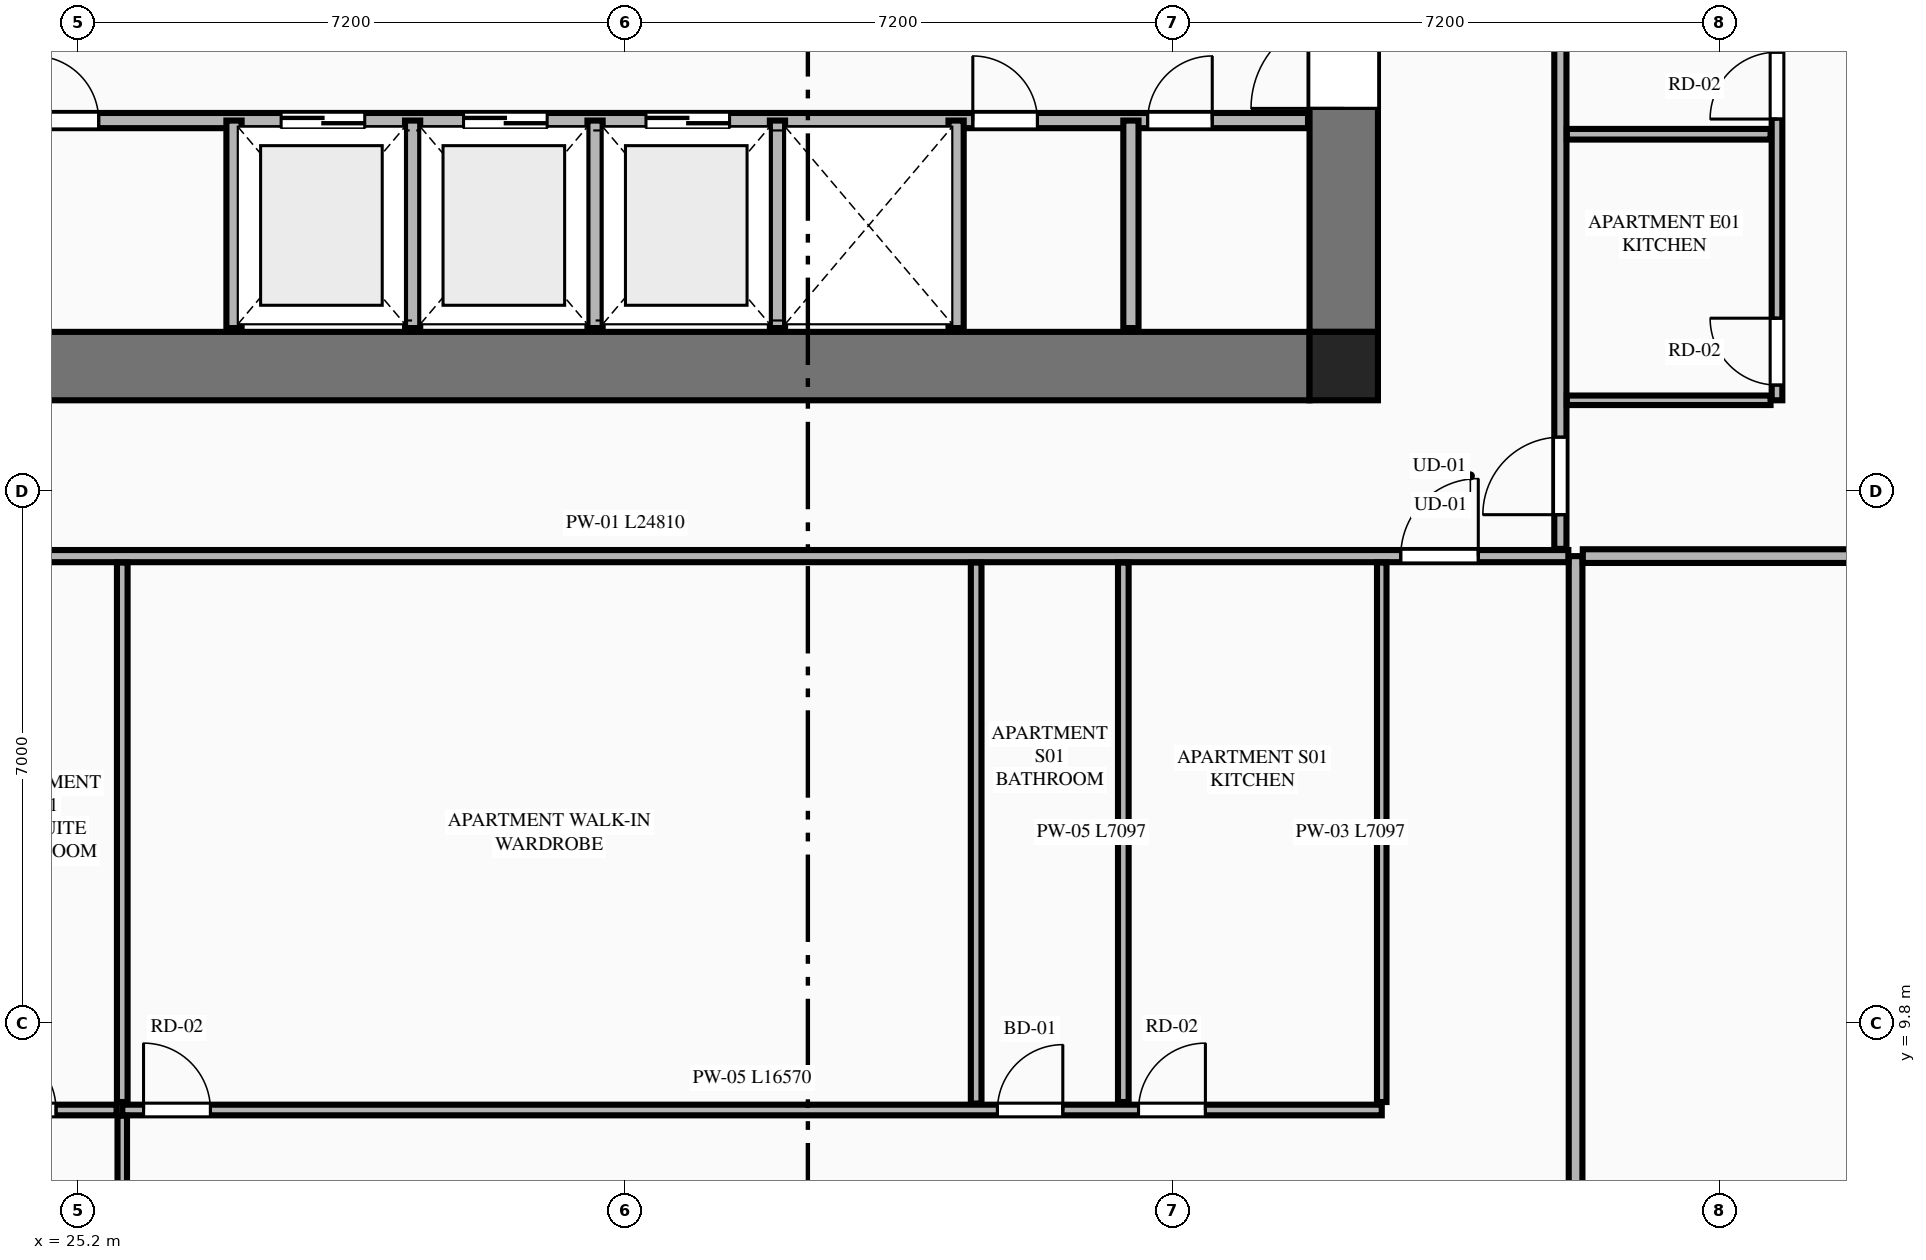
"""IFC4 building model, lengths in metres.
Left out: names, types, materials, properties, quantities, classifications, styles, units other than length and angle.
Written with IfcOpenShell. Run it as: python <this file> out.ifc"""

import sys

from ifc_helpers import new_model, si_unit, direction, frame, frame_2d, origin, origin_2d, place, context, subcontext, project, spatial, rectangle, extrude, element, fill, save


model = new_model("IFC4")
c1 = context("Model", 3, precision=1e-05, world=origin(), true_north=direction((0.0, 1.0)))
c2 = subcontext(c1, "Body", "Model", "MODEL_VIEW")
j1 = project(units=[si_unit("LENGTHUNIT", "METRE"), si_unit("PLANEANGLEUNIT", "RADIAN")], contexts=[c1])
p1 = place(None, origin())
s1 = spatial("IfcSite", under=j1, at=p1, CompositionType="ELEMENT")
p2 = place(p1, origin())
s2 = spatial("IfcBuilding", under=s1, at=p2, CompositionType="ELEMENT")
p3 = place(p2, frame((0.0, 0.0, 49.75)))
s3 = spatial("IfcBuildingStorey", under=s2, at=p3, CompositionType="ELEMENT", Elevation=49.75)
p4 = place(p3, frame((41.85, 18.45, 0.0), z_axis=(0.0, 0.0, 1.0), x_axis=(1.0, 0.0, 0.0)))
e1 = element("IfcColumn", 1, at=p4, inside=s3, PredefinedType="COLUMN", context=c2, shape_type="SweptSolid", body=[
    extrude(rectangle(XDim=0.9, YDim=0.9, at=origin_2d()), origin(), (0.0, 0.0, 1.0), 3.55),
])
p5 = place(p3, frame((23.4, 18.45, 0.0), z_axis=(0.0, 0.0, 1.0), x_axis=(1.0, 0.0, 0.0)))
e2 = element("IfcWall", 2, at=p5, inside=s3, PredefinedType="SHEAR", context=c2, shape_type="SweptSolid", body=[
    extrude(rectangle(XDim=18.0, YDim=0.9, at=frame_2d((9.0, 0.0))), origin(), (0.0, 0.0, 1.0), 3.33),
])
p6 = place(p3, frame((41.85, 18.9, 0.0), z_axis=(0.0, 0.0, 1.0), x_axis=(0.0, 1.0, 0.0)))
e3 = element("IfcWall", 3, at=p6, inside=s3, PredefinedType="SHEAR", context=c2, shape_type="SweptSolid", body=[
    extrude(rectangle(XDim=14.0, YDim=0.9, at=frame_2d((7.0, 0.0))), origin(), (0.0, 0.0, 1.0), 3.33),
])
p7 = place(p6, frame((2.94, 0.0, 0.0)))
e4 = element("IfcOpeningElement", 4, at=p7, cuts=e3, PredefinedType="OPENING", context=c2, shape_type="SweptSolid", body=[
    extrude(rectangle(XDim=1.22, YDim=2.25, at=frame_2d((0.61, 1.125))), frame((0.0, 0.46, 0.0), z_axis=(0.0, -1.0, 0.0), x_axis=(1.0, 0.0, 0.0)), (0.0, 0.0, 1.0), 0.92),
])
p8 = place(p3, frame((23.42, 21.68, 0.0), z_axis=(0.0, 0.0, 1.0), x_axis=(1.0, 0.0, 0.0)))
e5 = element("IfcWall", 5, at=p8, inside=s3, PredefinedType="PLUMBINGWALL", context=c2, shape_type="SweptSolid", body=[
    extrude(rectangle(XDim=17.96, YDim=0.2, at=frame_2d((8.98, 0.0))), origin(), (0.0, 0.0, 1.0), 3.33),
])
p9 = place(p8, frame((4.45, 0.0, 0.0)))
e6 = element("IfcOpeningElement", 6, at=p9, cuts=e5, PredefinedType="OPENING", context=c2, shape_type="SweptSolid", body=[
    extrude(rectangle(XDim=1.1, YDim=2.2, at=frame_2d((0.55, 1.1))), frame((0.0, 0.11, 0.0), z_axis=(0.0, -1.0, 0.0), x_axis=(1.0, 0.0, 0.0)), (0.0, 0.0, 1.0), 0.22),
])
p10 = place(p8, frame((6.85, 0.0, 0.0)))
e7 = element("IfcOpeningElement", 7, at=p10, cuts=e5, PredefinedType="OPENING", context=c2, shape_type="SweptSolid", body=[
    extrude(rectangle(XDim=1.1, YDim=2.2, at=frame_2d((0.55, 1.1))), frame((0.0, 0.11, 0.0), z_axis=(0.0, -1.0, 0.0), x_axis=(1.0, 0.0, 0.0)), (0.0, 0.0, 1.0), 0.22),
])
p11 = place(p8, frame((9.25, 0.0, 0.0)))
e8 = element("IfcOpeningElement", 8, at=p11, cuts=e5, PredefinedType="OPENING", context=c2, shape_type="SweptSolid", body=[
    extrude(rectangle(XDim=1.1, YDim=2.2, at=frame_2d((0.55, 1.1))), frame((0.0, 0.11, 0.0), z_axis=(0.0, -1.0, 0.0), x_axis=(1.0, 0.0, 0.0)), (0.0, 0.0, 1.0), 0.22),
])
p12 = place(p8, frame((1.2, 0.0, 0.0)))
e9 = element("IfcOpeningElement", 9, at=p12, cuts=e5, PredefinedType="OPENING", context=c2, shape_type="SweptSolid", body=[
    extrude(rectangle(XDim=0.85, YDim=2.05, at=frame_2d((0.425, 1.025))), frame((0.0, 0.11, 0.0), z_axis=(0.0, -1.0, 0.0), x_axis=(1.0, 0.0, 0.0)), (0.0, 0.0, 1.0), 0.22),
])
p13 = place(p8, frame((13.55, 0.0, 0.0)))
e10 = element("IfcOpeningElement", 10, at=p13, cuts=e5, PredefinedType="OPENING", context=c2, shape_type="SweptSolid", body=[
    extrude(rectangle(XDim=0.85, YDim=2.05, at=frame_2d((0.425, 1.025))), frame((0.0, 0.11, 0.0), z_axis=(0.0, -1.0, 0.0), x_axis=(1.0, 0.0, 0.0)), (0.0, 0.0, 1.0), 0.22),
])
p14 = place(p8, frame((15.85, 0.0, 0.0)))
e11 = element("IfcOpeningElement", 11, at=p14, cuts=e5, PredefinedType="OPENING", context=c2, shape_type="SweptSolid", body=[
    extrude(rectangle(XDim=0.85, YDim=2.05, at=frame_2d((0.425, 1.025))), frame((0.0, 0.11, 0.0), z_axis=(0.0, -1.0, 0.0), x_axis=(1.0, 0.0, 0.0)), (0.0, 0.0, 1.0), 0.22),
])
for number, where, z_axis, x_axis in (
    (12, (27.25, 18.95, 0.0), (0.0, 0.0, 1.0), (0.0, 1.0, 0.0)),
    (13, (29.6, 18.95, 0.0), (0.0, 0.0, 1.0), (0.0, 1.0, 0.0)),
    (14, (32.0, 18.95, 0.0), (0.0, 0.0, 1.0), (0.0, 1.0, 0.0)),
    (15, (34.4, 18.95, 0.0), (0.0, 0.0, 1.0), (0.0, 1.0, 0.0)),
    (16, (36.75, 18.95, 0.0), (0.0, 0.0, 1.0), (0.0, 1.0, 0.0)),
    (17, (39.05, 18.95, 0.0), (0.0, 0.0, 1.0), (0.0, 1.0, 0.0)),
):
    element("IfcWall", number, at=place(p3, frame(where, z_axis=z_axis, x_axis=x_axis)), inside=s3, PredefinedType="PLUMBINGWALL", context=c2, shape_type="SweptSolid", body=[
        extrude(rectangle(XDim=2.73, YDim=0.2, at=frame_2d((1.365, 0.0))), origin(), (0.0, 0.0, 1.0), 3.33),
    ])
p15 = place(p3, frame((44.9, 2.455, 0.0), z_axis=(0.0, 0.0, 1.0), x_axis=(0.0, 1.0, 0.0)))
e18 = element("IfcWall", 18, at=p15, inside=s3, PredefinedType="PARTITIONING", context=c2, shape_type="SweptSolid", body=[
    extrude(rectangle(XDim=13.495, YDim=0.18, at=frame_2d((6.748, 0.0))), origin(), (0.0, 0.0, 1.0), 3.33),
])
p16 = place(p3, frame((19.995, 15.95, 0.0), z_axis=(0.0, 0.0, 1.0), x_axis=(1.0, 0.0, 0.0)))
e19 = element("IfcWall", 19, at=p16, inside=s3, PredefinedType="PARTITIONING", context=c2, shape_type="SweptSolid", body=[
    extrude(rectangle(XDim=24.81, YDim=0.16, at=frame_2d((12.405, 0.0))), origin(), (0.0, 0.0, 1.0), 3.33),
])
p17 = place(p16, frame((22.605, 0.0, 0.0)))
e20 = element("IfcOpeningElement", 20, at=p17, cuts=e19, PredefinedType="OPENING", context=c2, shape_type="SweptSolid", body=[
    extrude(rectangle(XDim=1.02, YDim=2.25, at=frame_2d((0.51, 1.125))), frame((0.0, 0.09, 0.0), z_axis=(0.0, -1.0, 0.0), x_axis=(1.0, 0.0, 0.0)), (0.0, 0.0, 1.0), 0.18),
])
p18 = place(p3, frame((42.35, 8.768, 0.0), z_axis=(0.0, 0.0, 1.0), x_axis=(0.0, 1.0, 0.0)))
e21 = element("IfcWall", 21, at=p18, inside=s3, PredefinedType="PARTITIONING", context=c2, shape_type="SweptSolid", body=[
    extrude(rectangle(XDim=7.097, YDim=0.125, at=frame_2d((3.548, 0.0))), origin(), (0.0, 0.0, 1.0), 2.7),
])
p19 = place(p3, frame((25.78, 8.663, 0.0), z_axis=(0.0, 0.0, 1.0), x_axis=(1.0, 0.0, 0.0)))
e22 = element("IfcWall", 22, at=p19, inside=s3, PredefinedType="PLUMBINGWALL", context=c2, shape_type="SweptSolid", body=[
    extrude(rectangle(XDim=16.57, YDim=0.14, at=frame_2d((8.285, 0.0))), origin(), (0.0, 0.0, 1.0), 3.33),
])
p20 = place(p19, frame((0.28, 0.0, 0.0)))
e23 = element("IfcOpeningElement", 23, at=p20, cuts=e22, PredefinedType="OPENING", context=c2, shape_type="SweptSolid", body=[
    extrude(rectangle(XDim=0.88, YDim=2.15, at=frame_2d((0.44, 1.075))), frame((0.0, 0.08, 0.0), z_axis=(0.0, -1.0, 0.0), x_axis=(1.0, 0.0, 0.0)), (0.0, 0.0, 1.0), 0.16),
])
p21 = place(p19, frame((11.514, 0.0, 0.0)))
e24 = element("IfcOpeningElement", 24, at=p21, cuts=e22, PredefinedType="OPENING", context=c2, shape_type="SweptSolid", body=[
    extrude(rectangle(XDim=0.86, YDim=2.1, at=frame_2d((0.43, 1.05))), frame((0.0, 0.08, 0.0), z_axis=(0.0, -1.0, 0.0), x_axis=(1.0, 0.0, 0.0)), (0.0, 0.0, 1.0), 0.16),
])
p22 = place(p19, frame((13.37, 0.0, 0.0)))
e25 = element("IfcOpeningElement", 25, at=p22, cuts=e22, PredefinedType="OPENING", context=c2, shape_type="SweptSolid", body=[
    extrude(rectangle(XDim=0.88, YDim=2.15, at=frame_2d((0.44, 1.075))), frame((0.0, 0.08, 0.0), z_axis=(0.0, -1.0, 0.0), x_axis=(1.0, 0.0, 0.0)), (0.0, 0.0, 1.0), 0.16),
])
p23 = place(p3, frame((19.995, 8.663, 0.0), z_axis=(0.0, 0.0, 1.0), x_axis=(1.0, 0.0, 0.0)))
e26 = element("IfcWall", 26, at=p23, inside=s3, PredefinedType="PLUMBINGWALL", context=c2, shape_type="SweptSolid", body=[
    extrude(rectangle(XDim=5.71, YDim=0.14, at=frame_2d((2.855, 0.0))), origin(), (0.0, 0.0, 1.0), 3.33),
])
p24 = place(p23, frame((0.28, 0.0, 0.0)))
e27 = element("IfcOpeningElement", 27, at=p24, cuts=e26, PredefinedType="OPENING", context=c2, shape_type="SweptSolid", body=[
    extrude(rectangle(XDim=0.88, YDim=2.15, at=frame_2d((0.44, 1.075))), frame((0.0, 0.08, 0.0), z_axis=(0.0, -1.0, 0.0), x_axis=(1.0, 0.0, 0.0)), (0.0, 0.0, 1.0), 0.16),
])
p25 = place(p23, frame((4.054, 0.0, 0.0)))
e28 = element("IfcOpeningElement", 28, at=p25, cuts=e26, PredefinedType="OPENING", context=c2, shape_type="SweptSolid", body=[
    extrude(rectangle(XDim=0.86, YDim=2.1, at=frame_2d((0.43, 1.05))), frame((0.0, 0.08, 0.0), z_axis=(0.0, -1.0, 0.0), x_axis=(1.0, 0.0, 0.0)), (0.0, 0.0, 1.0), 0.16),
])
for number, where, z_axis, x_axis in (
    (29, (38.95, 8.768, 0.0), (0.0, 0.0, 1.0), (0.0, 1.0, 0.0)),
    (30, (25.78, 8.768, 0.0), (0.0, 0.0, 1.0), (0.0, 1.0, 0.0)),
):
    element("IfcWall", number, at=place(p3, frame(where, z_axis=z_axis, x_axis=x_axis)), inside=s3, PredefinedType="PLUMBINGWALL", context=c2, shape_type="SweptSolid", body=[
        extrude(rectangle(XDim=7.097, YDim=0.14, at=frame_2d((3.548, 0.0))), origin(), (0.0, 0.0, 1.0), 3.33),
    ])
p26 = place(p3, frame((25.78, 2.365, 0.0), z_axis=(0.0, 0.0, 1.0), x_axis=(0.0, 1.0, 0.0)))
e31 = element("IfcWall", 31, at=p26, inside=s3, PredefinedType="PARTITIONING", context=c2, shape_type="SweptSolid", body=[
    extrude(rectangle(XDim=6.223, YDim=0.125, at=frame_2d((3.111, 0.0))), origin(), (0.0, 0.0, 1.0), 3.33),
])
p27 = place(p26, frame((0.35, 0.0, 0.0)))
e32 = element("IfcOpeningElement", 32, at=p27, cuts=e31, PredefinedType="OPENING", context=c2, shape_type="SweptSolid", body=[
    extrude(rectangle(XDim=0.92, YDim=2.15, at=frame_2d((0.46, 1.075))), frame((0.0, 0.073, 0.0), z_axis=(0.0, -1.0, 0.0), x_axis=(1.0, 0.0, 0.0)), (0.0, 0.0, 1.0), 0.145),
])
p28 = place(p3, frame((37.014, 8.748, 0.0), z_axis=(0.0, 0.0, 1.0), x_axis=(0.0, 1.0, 0.0)))
e33 = element("IfcWall", 33, at=p28, inside=s3, PredefinedType="PLUMBINGWALL", context=c2, shape_type="SweptSolid", body=[
    extrude(rectangle(XDim=7.117, YDim=0.14, at=frame_2d((3.559, 0.0))), origin(), (0.0, 0.0, 1.0), 3.33),
])
p29 = place(p3, frame((44.995, 15.95, 0.0), z_axis=(0.0, 0.0, 1.0), x_axis=(1.0, 0.0, 0.0)))
e34 = element("IfcWall", 34, at=p29, inside=s3, PredefinedType="PARTITIONING", context=c2, shape_type="SweptSolid", body=[
    extrude(rectangle(XDim=9.241, YDim=0.18, at=frame_2d((4.621, 0.0))), origin(), (0.0, 0.0, 1.0), 3.33),
])
p30 = place(p3, frame((44.7, 16.045, 0.0), z_axis=(0.0, 0.0, 1.0), x_axis=(0.0, 1.0, 0.0)))
e35 = element("IfcWall", 35, at=p30, inside=s3, PredefinedType="PARTITIONING", context=c2, shape_type="SweptSolid", body=[
    extrude(rectangle(XDim=19.71, YDim=0.16, at=frame_2d((9.855, 0.0))), origin(), (0.0, 0.0, 1.0), 2.7),
])
p31 = place(p30, frame((0.45, 0.0, 0.0)))
e36 = element("IfcOpeningElement", 36, at=p31, cuts=e35, PredefinedType="OPENING", context=c2, shape_type="SweptSolid", body=[
    extrude(rectangle(XDim=1.02, YDim=2.25, at=frame_2d((0.51, 1.125))), frame((0.0, 0.09, 0.0), z_axis=(0.0, -1.0, 0.0), x_axis=(1.0, 0.0, 0.0)), (0.0, 0.0, 1.0), 0.18),
])
p32 = place(p3, frame((44.785, 18.0, 0.0), z_axis=(0.0, 0.0, 1.0), x_axis=(1.0, 0.0, 0.0)))
e37 = element("IfcWall", 37, at=p32, inside=s3, PredefinedType="PARTITIONING", context=c2, shape_type="SweptSolid", body=[
    extrude(rectangle(XDim=2.68, YDim=0.125, at=frame_2d((1.34, 0.0))), origin(), (0.0, 0.0, 1.0), 2.7),
])
p33 = place(p3, frame((47.55, 18.0, 0.0), z_axis=(0.0, 0.0, 1.0), x_axis=(0.0, 1.0, 0.0)))
e38 = element("IfcWall", 38, at=p33, inside=s3, PredefinedType="PLUMBINGWALL", context=c2, shape_type="SweptSolid", body=[
    extrude(rectangle(XDim=13.392, YDim=0.14, at=frame_2d((6.696, 0.0))), origin(), (0.0, 0.0, 1.0), 3.33),
])
p34 = place(p33, frame((0.2, 0.0, 0.0)))
e39 = element("IfcOpeningElement", 39, at=p34, cuts=e38, PredefinedType="OPENING", context=c2, shape_type="SweptSolid", body=[
    extrude(rectangle(XDim=0.88, YDim=2.15, at=frame_2d((0.44, 1.075))), frame((0.0, 0.08, 0.0), z_axis=(0.0, -1.0, 0.0), x_axis=(1.0, 0.0, 0.0)), (0.0, 0.0, 1.0), 0.16),
])
p35 = place(p33, frame((3.7, 0.0, 0.0)))
e40 = element("IfcOpeningElement", 40, at=p35, cuts=e38, PredefinedType="OPENING", context=c2, shape_type="SweptSolid", body=[
    extrude(rectangle(XDim=0.88, YDim=2.15, at=frame_2d((0.44, 1.075))), frame((0.0, 0.08, 0.0), z_axis=(0.0, -1.0, 0.0), x_axis=(1.0, 0.0, 0.0)), (0.0, 0.0, 1.0), 0.16),
])
p36 = place(p33, frame((10.192, 0.0, 0.0)))
e41 = element("IfcOpeningElement", 41, at=p36, cuts=e38, PredefinedType="OPENING", context=c2, shape_type="SweptSolid", body=[
    extrude(rectangle(XDim=0.86, YDim=2.1, at=frame_2d((0.43, 1.05))), frame((0.0, 0.08, 0.0), z_axis=(0.0, -1.0, 0.0), x_axis=(1.0, 0.0, 0.0)), (0.0, 0.0, 1.0), 0.16),
])
p37 = place(p3, frame((44.785, 21.5, 0.0), z_axis=(0.0, 0.0, 1.0), x_axis=(1.0, 0.0, 0.0)))
e42 = element("IfcWall", 42, at=p37, inside=s3, PredefinedType="PLUMBINGWALL", context=c2, shape_type="SweptSolid", body=[
    extrude(rectangle(XDim=2.68, YDim=0.14, at=frame_2d((1.34, 0.0))), origin(), (0.0, 0.0, 1.0), 3.33),
])
p38 = place(p7, origin())
e43 = element("IfcDoor", 43, at=p38, inside=s3, OperationType="SINGLE_SWING_LEFT", PredefinedType="DOOR", context=c2, shape_type="SweptSolid", body=[
    extrude(rectangle(XDim=1.22, YDim=2.25, at=frame_2d((0.61, 1.125))), frame((0.0, 0.025, 0.0), z_axis=(0.0, -1.0, 0.0), x_axis=(1.0, 0.0, 0.0)), (0.0, 0.0, 1.0), 0.05),
])
fill(e4, e43)
p39 = place(p9, origin())
e44 = element("IfcDoor", 44, at=p39, inside=s3, OperationType="DOUBLE_DOOR_SLIDING", PredefinedType="DOOR", context=c2, shape_type="SweptSolid", body=[
    extrude(rectangle(XDim=1.1, YDim=2.2, at=frame_2d((0.55, 1.1))), frame((0.0, 0.025, 0.0), z_axis=(0.0, -1.0, 0.0), x_axis=(1.0, 0.0, 0.0)), (0.0, 0.0, 1.0), 0.05),
])
fill(e6, e44)
p40 = place(p10, origin())
e45 = element("IfcDoor", 45, at=p40, inside=s3, OperationType="DOUBLE_DOOR_SLIDING", PredefinedType="DOOR", context=c2, shape_type="SweptSolid", body=[
    extrude(rectangle(XDim=1.1, YDim=2.2, at=frame_2d((0.55, 1.1))), frame((0.0, 0.025, 0.0), z_axis=(0.0, -1.0, 0.0), x_axis=(1.0, 0.0, 0.0)), (0.0, 0.0, 1.0), 0.05),
])
fill(e7, e45)
p41 = place(p11, origin())
e46 = element("IfcDoor", 46, at=p41, inside=s3, OperationType="DOUBLE_DOOR_SLIDING", PredefinedType="DOOR", context=c2, shape_type="SweptSolid", body=[
    extrude(rectangle(XDim=1.1, YDim=2.2, at=frame_2d((0.55, 1.1))), frame((0.0, 0.025, 0.0), z_axis=(0.0, -1.0, 0.0), x_axis=(1.0, 0.0, 0.0)), (0.0, 0.0, 1.0), 0.05),
])
fill(e8, e46)
p42 = place(p12, origin())
e47 = element("IfcDoor", 47, at=p42, inside=s3, OperationType="SINGLE_SWING_LEFT", PredefinedType="DOOR", context=c2, shape_type="SweptSolid", body=[
    extrude(rectangle(XDim=0.85, YDim=2.05, at=frame_2d((0.425, 1.025))), frame((0.0, 0.025, 0.0), z_axis=(0.0, -1.0, 0.0), x_axis=(1.0, 0.0, 0.0)), (0.0, 0.0, 1.0), 0.05),
])
fill(e9, e47)
p43 = place(p13, origin())
e48 = element("IfcDoor", 48, at=p43, inside=s3, OperationType="SINGLE_SWING_LEFT", PredefinedType="DOOR", context=c2, shape_type="SweptSolid", body=[
    extrude(rectangle(XDim=0.85, YDim=2.05, at=frame_2d((0.425, 1.025))), frame((0.0, 0.025, 0.0), z_axis=(0.0, -1.0, 0.0), x_axis=(1.0, 0.0, 0.0)), (0.0, 0.0, 1.0), 0.05),
])
fill(e10, e48)
p44 = place(p14, origin())
e49 = element("IfcDoor", 49, at=p44, inside=s3, OperationType="SINGLE_SWING_RIGHT", PredefinedType="DOOR", context=c2, shape_type="SweptSolid", body=[
    extrude(rectangle(XDim=0.85, YDim=2.05, at=frame_2d((0.425, 1.025))), frame((0.0, 0.025, 0.0), z_axis=(0.0, -1.0, 0.0), x_axis=(1.0, 0.0, 0.0)), (0.0, 0.0, 1.0), 0.05),
])
fill(e11, e49)
p45 = place(p20, origin())
e50 = element("IfcDoor", 50, at=p45, inside=s3, OperationType="SINGLE_SWING_LEFT", PredefinedType="DOOR", context=c2, shape_type="SweptSolid", body=[
    extrude(rectangle(XDim=0.88, YDim=2.15, at=frame_2d((0.44, 1.075))), frame((0.0, 0.025, 0.0), z_axis=(0.0, -1.0, 0.0), x_axis=(1.0, 0.0, 0.0)), (0.0, 0.0, 1.0), 0.05),
])
fill(e23, e50)
p46 = place(p21, origin())
e51 = element("IfcDoor", 51, at=p46, inside=s3, OperationType="SINGLE_SWING_RIGHT", PredefinedType="DOOR", context=c2, shape_type="SweptSolid", body=[
    extrude(rectangle(XDim=0.86, YDim=2.1, at=frame_2d((0.43, 1.05))), frame((0.0, 0.025, 0.0), z_axis=(0.0, -1.0, 0.0), x_axis=(1.0, 0.0, 0.0)), (0.0, 0.0, 1.0), 0.05),
])
fill(e24, e51)
p47 = place(p25, origin())
e52 = element("IfcDoor", 52, at=p47, inside=s3, OperationType="SINGLE_SWING_LEFT", PredefinedType="DOOR", context=c2, shape_type="SweptSolid", body=[
    extrude(rectangle(XDim=0.86, YDim=2.1, at=frame_2d((0.43, 1.05))), frame((0.0, 0.025, 0.0), z_axis=(0.0, -1.0, 0.0), x_axis=(1.0, 0.0, 0.0)), (0.0, 0.0, 1.0), 0.05),
])
fill(e28, e52)
p48 = place(p17, origin())
e53 = element("IfcDoor", 53, at=p48, inside=s3, OperationType="SINGLE_SWING_RIGHT", PredefinedType="DOOR", context=c2, shape_type="SweptSolid", body=[
    extrude(rectangle(XDim=1.02, YDim=2.25, at=frame_2d((0.51, 1.125))), frame((0.0, 0.025, 0.0), z_axis=(0.0, -1.0, 0.0), x_axis=(1.0, 0.0, 0.0)), (0.0, 0.0, 1.0), 0.05),
])
fill(e20, e53)
p49 = place(p22, origin())
e54 = element("IfcDoor", 54, at=p49, inside=s3, OperationType="SINGLE_SWING_RIGHT", PredefinedType="DOOR", context=c2, shape_type="SweptSolid", body=[
    extrude(rectangle(XDim=0.88, YDim=2.15, at=frame_2d((0.44, 1.075))), frame((0.0, 0.025, 0.0), z_axis=(0.0, -1.0, 0.0), x_axis=(1.0, 0.0, 0.0)), (0.0, 0.0, 1.0), 0.05),
])
fill(e25, e54)
p50 = place(p34, origin())
e55 = element("IfcDoor", 55, at=p50, inside=s3, OperationType="SINGLE_SWING_RIGHT", PredefinedType="DOOR", context=c2, shape_type="SweptSolid", body=[
    extrude(rectangle(XDim=0.88, YDim=2.15, at=frame_2d((0.44, 1.075))), frame((0.0, 0.025, 0.0), z_axis=(0.0, -1.0, 0.0), x_axis=(1.0, 0.0, 0.0)), (0.0, 0.0, 1.0), 0.05),
])
fill(e39, e55)
p51 = place(p35, origin())
e56 = element("IfcDoor", 56, at=p51, inside=s3, OperationType="SINGLE_SWING_LEFT", PredefinedType="DOOR", context=c2, shape_type="SweptSolid", body=[
    extrude(rectangle(XDim=0.88, YDim=2.15, at=frame_2d((0.44, 1.075))), frame((0.0, 0.025, 0.0), z_axis=(0.0, -1.0, 0.0), x_axis=(1.0, 0.0, 0.0)), (0.0, 0.0, 1.0), 0.05),
])
fill(e40, e56)
p52 = place(p31, origin())
e57 = element("IfcDoor", 57, at=p52, inside=s3, OperationType="SINGLE_SWING_LEFT", PredefinedType="DOOR", context=c2, shape_type="SweptSolid", body=[
    extrude(rectangle(XDim=1.02, YDim=2.25, at=frame_2d((0.51, 1.125))), frame((0.0, 0.025, 0.0), z_axis=(0.0, -1.0, 0.0), x_axis=(1.0, 0.0, 0.0)), (0.0, 0.0, 1.0), 0.05),
])
fill(e36, e57)
save(model, sys.argv[1])
